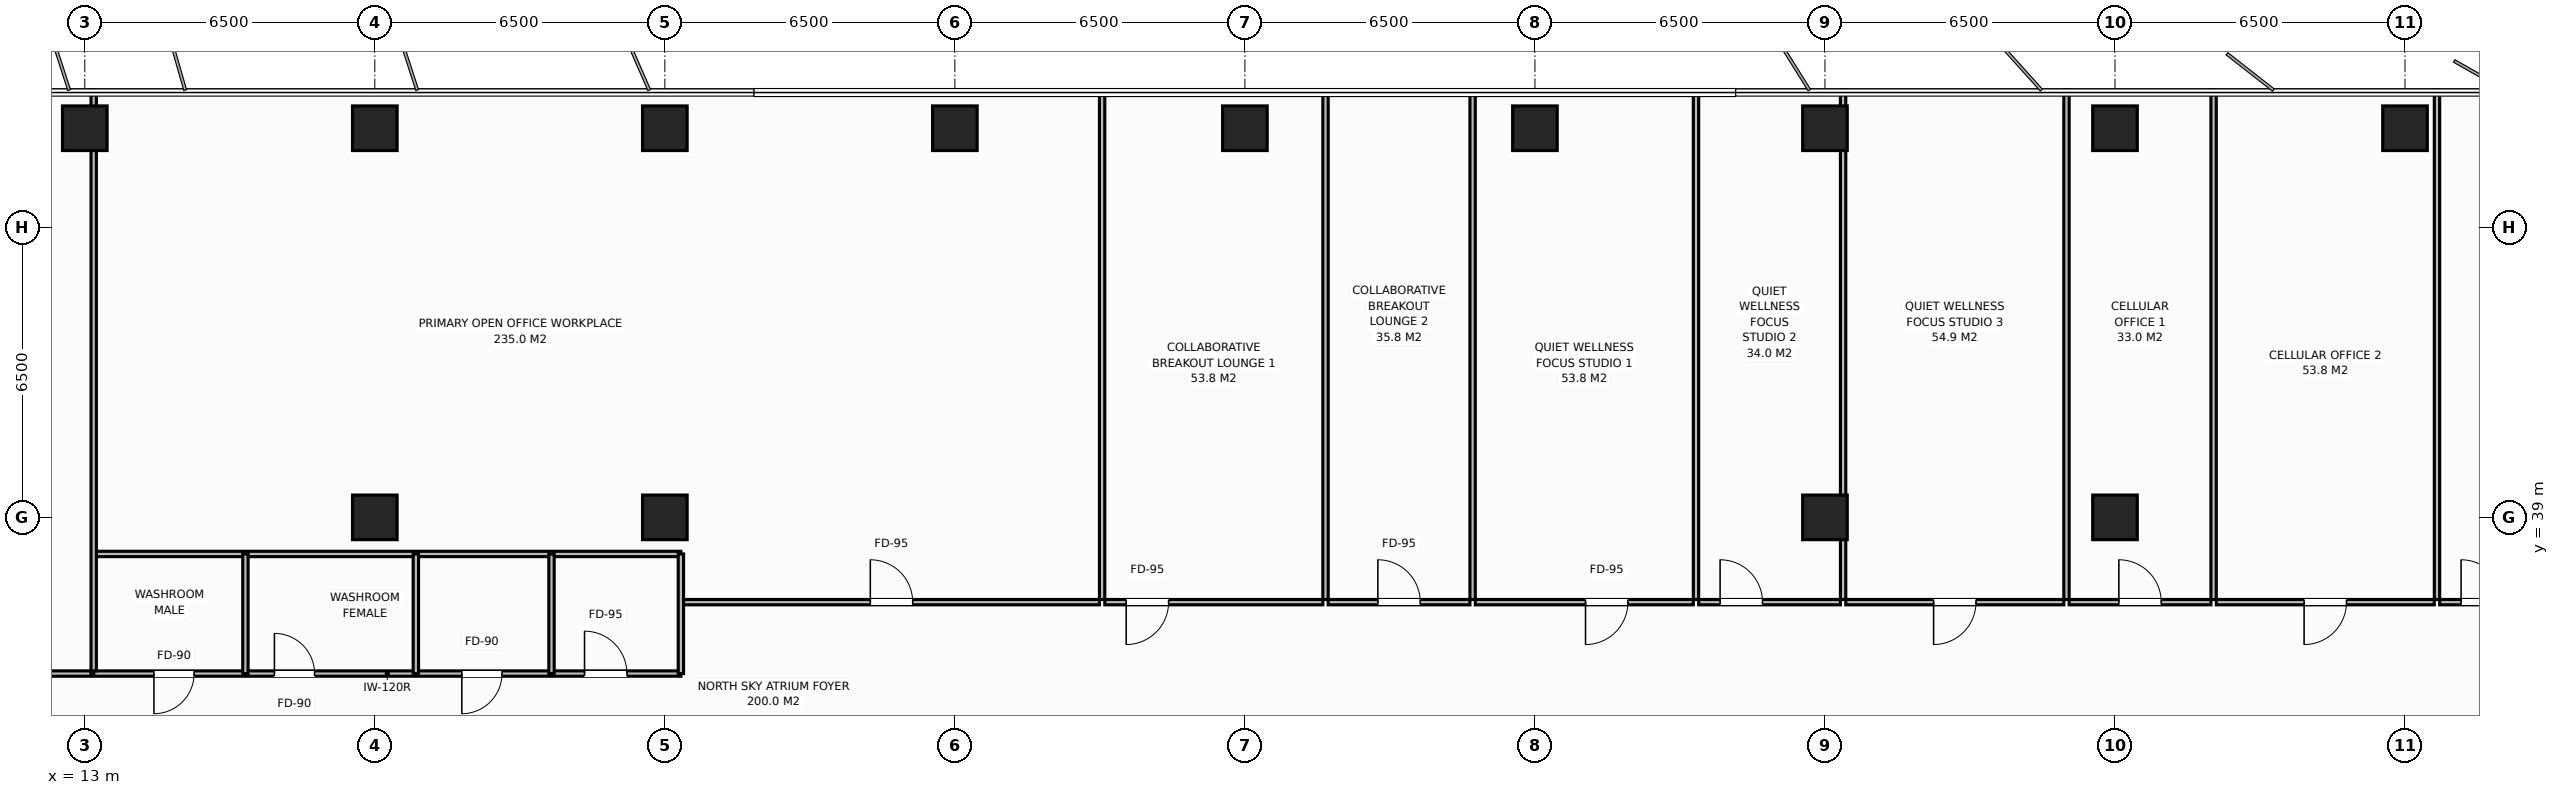
"""IFC4 building model, lengths in metres.
Left out: names, types, materials, properties, quantities, classifications, styles, units other than length and angle.
Written with IfcOpenShell. Run it as: python <this file> out.ifc"""

import sys

from ifc_helpers import new_model, si_unit, direction, frame, frame_2d, origin, origin_2d, place, context, subcontext, project, spatial, rectangle, extrude, element, fill, save


model = new_model("IFC4")
c1 = context("Model", 3, precision=1e-05, world=origin(), true_north=direction((0.0, 1.0)))
c2 = subcontext(c1, "Body", "Model", "MODEL_VIEW")
j1 = project(units=[si_unit("LENGTHUNIT", "METRE"), si_unit("PLANEANGLEUNIT", "RADIAN")], contexts=[c1])
p1 = place(None, origin())
s1 = spatial("IfcSite", under=j1, at=p1, CompositionType="ELEMENT")
p2 = place(p1, origin())
s2 = spatial("IfcBuilding", under=s1, at=p2, CompositionType="ELEMENT")
p3 = place(p2, frame((0.0, 0.0, 193.6)))
s3 = spatial("IfcBuildingStorey", under=s2, at=p3, CompositionType="ELEMENT", Elevation=193.6)
for number, where, z_axis, x_axis in (
    (1, (19.5, 39.0, 0.0), (0.0, 0.0, 1.0), (1.0, 0.0, 0.0)),
    (2, (58.5, 39.0, 0.0), (0.0, 0.0, 1.0), (1.0, 0.0, 0.0)),
    (3, (26.0, 39.0, 0.0), (0.0, 0.0, 1.0), (1.0, 0.0, 0.0)),
    (4, (52.0, 39.0, 0.0), (0.0, 0.0, 1.0), (1.0, 0.0, 0.0)),
    (5, (13.0, 47.72, 0.0), (0.0, 0.0, 1.0), (1.0, 0.0, 0.0)),
    (6, (19.5, 47.72, 0.0), (0.0, 0.0, 1.0), (1.0, 0.0, 0.0)),
    (7, (26.0, 47.72, 0.0), (0.0, 0.0, 1.0), (1.0, 0.0, 0.0)),
    (8, (32.5, 47.72, 0.0), (0.0, 0.0, 1.0), (1.0, 0.0, 0.0)),
    (9, (39.0, 47.72, 0.0), (0.0, 0.0, 1.0), (1.0, 0.0, 0.0)),
    (10, (45.5, 47.72, 0.0), (0.0, 0.0, 1.0), (1.0, 0.0, 0.0)),
    (11, (52.0, 47.72, 0.0), (0.0, 0.0, 1.0), (1.0, 0.0, 0.0)),
    (12, (58.5, 47.72, 0.0), (0.0, 0.0, 1.0), (1.0, 0.0, 0.0)),
    (13, (65.0, 47.72, 0.0), (0.0, 0.0, 1.0), (1.0, 0.0, 0.0)),
):
    element("IfcColumn", number, at=place(p3, frame(where, z_axis=z_axis, x_axis=x_axis)), inside=s3, PredefinedType="COLUMN", context=c2, shape_type="SweptSolid", body=[
        extrude(rectangle(XDim=1.0, YDim=1.0, at=origin_2d()), origin(), (0.0, 0.0, 1.0), 3.8),
    ])
p4 = place(p3, frame((13.2, 35.5, 0.0), z_axis=(0.0, 0.0, 1.0), x_axis=(1.0, 0.0, 0.0)))
e14 = element("IfcWall", 14, at=p4, inside=s3, PredefinedType="PARTITIONING", context=c2, shape_type="SweptSolid", body=[
    extrude(rectangle(XDim=13.16, YDim=0.12, at=frame_2d((6.58, 0.0))), origin(), (0.0, 0.0, 1.0), 3.52),
])
p5 = place(p4, frame((1.35, 0.0, 0.0)))
e15 = element("IfcOpeningElement", 15, at=p5, cuts=e14, PredefinedType="OPENING", context=c2, shape_type="SweptSolid", body=[
    extrude(rectangle(XDim=0.9, YDim=2.15, at=frame_2d((0.45, 1.075))), frame((0.0, 0.07, 0.0), z_axis=(0.0, -1.0, 0.0), x_axis=(1.0, 0.0, 0.0)), (0.0, 0.0, 1.0), 0.14),
])
p6 = place(p4, frame((4.05, 0.0, 0.0)))
e16 = element("IfcOpeningElement", 16, at=p6, cuts=e14, PredefinedType="OPENING", context=c2, shape_type="SweptSolid", body=[
    extrude(rectangle(XDim=0.9, YDim=2.15, at=frame_2d((0.45, 1.075))), frame((0.0, 0.07, 0.0), z_axis=(0.0, -1.0, 0.0), x_axis=(1.0, 0.0, 0.0)), (0.0, 0.0, 1.0), 0.14),
])
p7 = place(p4, frame((8.25, 0.0, 0.0)))
e17 = element("IfcOpeningElement", 17, at=p7, cuts=e14, PredefinedType="OPENING", context=c2, shape_type="SweptSolid", body=[
    extrude(rectangle(XDim=0.9, YDim=2.15, at=frame_2d((0.45, 1.075))), frame((0.0, 0.07, 0.0), z_axis=(0.0, -1.0, 0.0), x_axis=(1.0, 0.0, 0.0)), (0.0, 0.0, 1.0), 0.14),
])
p8 = place(p4, frame((11.0, 0.0, 0.0)))
e18 = element("IfcOpeningElement", 18, at=p8, cuts=e14, PredefinedType="OPENING", context=c2, shape_type="SweptSolid", body=[
    extrude(rectangle(XDim=0.95, YDim=2.15, at=frame_2d((0.475, 1.075))), frame((0.0, 0.07, 0.0), z_axis=(0.0, -1.0, 0.0), x_axis=(1.0, 0.0, 0.0)), (0.0, 0.0, 1.0), 0.14),
])
p9 = place(p3, frame((13.2, 38.18, 0.0), z_axis=(0.0, 0.0, 1.0), x_axis=(1.0, 0.0, 0.0)))
e19 = element("IfcWall", 19, at=p9, inside=s3, PredefinedType="PARTITIONING", context=c2, shape_type="SweptSolid", body=[
    extrude(rectangle(XDim=13.16, YDim=0.12, at=frame_2d((6.58, 0.0))), origin(), (0.0, 0.0, 1.0), 3.52),
])
for number, where, z_axis, x_axis in (
    (20, (16.6, 35.5, 0.0), (0.0, 0.0, 1.0), (0.0, 1.0, 0.0)),
    (21, (20.42, 35.5, 0.0), (0.0, 0.0, 1.0), (0.0, 1.0, 0.0)),
    (22, (23.46, 35.5, 0.0), (0.0, 0.0, 1.0), (0.0, 1.0, 0.0)),
    (23, (26.36, 35.5, 0.0), (0.0, 0.0, 1.0), (0.0, 1.0, 0.0)),
):
    element("IfcWall", number, at=place(p3, frame(where, z_axis=z_axis, x_axis=x_axis)), inside=s3, PredefinedType="PARTITIONING", context=c2, shape_type="SweptSolid", body=[
        extrude(rectangle(XDim=2.68, YDim=0.12, at=frame_2d((1.34, 0.0))), origin(), (0.0, 0.0, 1.0), 3.52),
    ])
p10 = place(p3, frame((13.2, 35.56, 0.0), z_axis=(0.0, 0.0, 1.0), x_axis=(0.0, 1.0, 0.0)))
e24 = element("IfcWall", 24, at=p10, inside=s3, PredefinedType="PARTITIONING", context=c2, shape_type="SweptSolid", body=[
    extrude(rectangle(XDim=13.02, YDim=0.12, at=frame_2d((6.51, 0.0))), origin(), (0.0, 0.0, 1.0), 2.72),
])
p11 = place(p3, frame((3.98, 35.5, 0.0), z_axis=(0.0, 0.0, 1.0), x_axis=(1.0, 0.0, 0.0)))
e25 = element("IfcWall", 25, at=p11, inside=s3, PredefinedType="PARTITIONING", context=c2, shape_type="SweptSolid", body=[
    extrude(rectangle(XDim=9.16, YDim=0.12, at=frame_2d((4.58, 0.0))), origin(), (0.0, 0.0, 1.0), 3.52),
])
p12 = place(p11, frame((6.9, 0.0, 0.0)))
e26 = element("IfcOpeningElement", 26, at=p12, cuts=e25, PredefinedType="OPENING", context=c2, shape_type="SweptSolid", body=[
    extrude(rectangle(XDim=0.95, YDim=2.15, at=frame_2d((0.475, 1.075))), frame((0.0, 0.07, 0.0), z_axis=(0.0, -1.0, 0.0), x_axis=(1.0, 0.0, 0.0)), (0.0, 0.0, 1.0), 0.14),
])
p13 = place(p3, frame((35.8, 37.16, 0.0), z_axis=(0.0, 0.0, 1.0), x_axis=(0.0, 1.0, 0.0)))
e27 = element("IfcWall", 27, at=p13, inside=s3, PredefinedType="PARTITIONING", context=c2, shape_type="SweptSolid", body=[
    extrude(rectangle(XDim=11.42, YDim=0.12, at=frame_2d((5.71, 0.0))), origin(), (0.0, 0.0, 1.0), 3.52),
])
p14 = place(p3, frame((26.42, 37.1, 0.0), z_axis=(0.0, 0.0, 1.0), x_axis=(1.0, 0.0, 0.0)))
e28 = element("IfcWall", 28, at=p14, inside=s3, PredefinedType="PARTITIONING", context=c2, shape_type="SweptSolid", body=[
    extrude(rectangle(XDim=9.32, YDim=0.12, at=frame_2d((4.66, 0.0))), origin(), (0.0, 0.0, 1.0), 3.52),
])
p15 = place(p14, frame((4.185, 0.0, 0.0)))
e29 = element("IfcOpeningElement", 29, at=p15, cuts=e28, PredefinedType="OPENING", context=c2, shape_type="SweptSolid", body=[
    extrude(rectangle(XDim=0.95, YDim=2.15, at=frame_2d((0.475, 1.075))), frame((0.0, 0.07, 0.0), z_axis=(0.0, -1.0, 0.0), x_axis=(1.0, 0.0, 0.0)), (0.0, 0.0, 1.0), 0.14),
])
p16 = place(p3, frame((40.806, 37.16, 0.0), z_axis=(0.0, 0.0, 1.0), x_axis=(0.0, 1.0, 0.0)))
e30 = element("IfcWall", 30, at=p16, inside=s3, PredefinedType="PARTITIONING", context=c2, shape_type="SweptSolid", body=[
    extrude(rectangle(XDim=11.42, YDim=0.12, at=frame_2d((5.71, 0.0))), origin(), (0.0, 0.0, 1.0), 3.52),
])
p17 = place(p3, frame((35.86, 37.1, 0.0), z_axis=(0.0, 0.0, 1.0), x_axis=(1.0, 0.0, 0.0)))
e31 = element("IfcWall", 31, at=p17, inside=s3, PredefinedType="PARTITIONING", context=c2, shape_type="SweptSolid", body=[
    extrude(rectangle(XDim=4.886, YDim=0.12, at=frame_2d((2.443, 0.0))), origin(), (0.0, 0.0, 1.0), 3.52),
])
p18 = place(p17, frame((0.48, 0.0, 0.0)))
e32 = element("IfcOpeningElement", 32, at=p18, cuts=e31, PredefinedType="OPENING", context=c2, shape_type="SweptSolid", body=[
    extrude(rectangle(XDim=0.95, YDim=2.15, at=frame_2d((0.475, 1.075))), frame((0.0, 0.07, 0.0), z_axis=(0.0, -1.0, 0.0), x_axis=(1.0, 0.0, 0.0)), (0.0, 0.0, 1.0), 0.14),
])
p19 = place(p3, frame((44.104, 37.16, 0.0), z_axis=(0.0, 0.0, 1.0), x_axis=(0.0, 1.0, 0.0)))
e33 = element("IfcWall", 33, at=p19, inside=s3, PredefinedType="PARTITIONING", context=c2, shape_type="SweptSolid", body=[
    extrude(rectangle(XDim=11.42, YDim=0.12, at=frame_2d((5.71, 0.0))), origin(), (0.0, 0.0, 1.0), 3.52),
])
p20 = place(p3, frame((40.866, 37.1, 0.0), z_axis=(0.0, 0.0, 1.0), x_axis=(1.0, 0.0, 0.0)))
e34 = element("IfcWall", 34, at=p20, inside=s3, PredefinedType="PARTITIONING", context=c2, shape_type="SweptSolid", body=[
    extrude(rectangle(XDim=3.177, YDim=0.12, at=frame_2d((1.588, 0.0))), origin(), (0.0, 0.0, 1.0), 3.52),
])
p21 = place(p20, frame((1.113, 0.0, 0.0)))
e35 = element("IfcOpeningElement", 35, at=p21, cuts=e34, PredefinedType="OPENING", context=c2, shape_type="SweptSolid", body=[
    extrude(rectangle(XDim=0.95, YDim=2.15, at=frame_2d((0.475, 1.075))), frame((0.0, 0.07, 0.0), z_axis=(0.0, -1.0, 0.0), x_axis=(1.0, 0.0, 0.0)), (0.0, 0.0, 1.0), 0.14),
])
p22 = place(p3, frame((49.11, 37.16, 0.0), z_axis=(0.0, 0.0, 1.0), x_axis=(0.0, 1.0, 0.0)))
e36 = element("IfcWall", 36, at=p22, inside=s3, PredefinedType="PARTITIONING", context=c2, shape_type="SweptSolid", body=[
    extrude(rectangle(XDim=11.42, YDim=0.12, at=frame_2d((5.71, 0.0))), origin(), (0.0, 0.0, 1.0), 3.52),
])
p23 = place(p3, frame((44.163, 37.1, 0.0), z_axis=(0.0, 0.0, 1.0), x_axis=(1.0, 0.0, 0.0)))
e37 = element("IfcWall", 37, at=p23, inside=s3, PredefinedType="PARTITIONING", context=c2, shape_type="SweptSolid", body=[
    extrude(rectangle(XDim=4.886, YDim=0.12, at=frame_2d((2.443, 0.0))), origin(), (0.0, 0.0, 1.0), 3.52),
])
p24 = place(p23, frame((2.47, 0.0, 0.0)))
e38 = element("IfcOpeningElement", 38, at=p24, cuts=e37, PredefinedType="OPENING", context=c2, shape_type="SweptSolid", body=[
    extrude(rectangle(XDim=0.95, YDim=2.15, at=frame_2d((0.475, 1.075))), frame((0.0, 0.07, 0.0), z_axis=(0.0, -1.0, 0.0), x_axis=(1.0, 0.0, 0.0)), (0.0, 0.0, 1.0), 0.14),
])
p25 = place(p3, frame((52.407, 37.16, 0.0), z_axis=(0.0, 0.0, 1.0), x_axis=(0.0, 1.0, 0.0)))
e39 = element("IfcWall", 39, at=p25, inside=s3, PredefinedType="PARTITIONING", context=c2, shape_type="SweptSolid", body=[
    extrude(rectangle(XDim=11.42, YDim=0.12, at=frame_2d((5.71, 0.0))), origin(), (0.0, 0.0, 1.0), 3.52),
])
p26 = place(p3, frame((49.17, 37.1, 0.0), z_axis=(0.0, 0.0, 1.0), x_axis=(1.0, 0.0, 0.0)))
e40 = element("IfcWall", 40, at=p26, inside=s3, PredefinedType="PARTITIONING", context=c2, shape_type="SweptSolid", body=[
    extrude(rectangle(XDim=3.177, YDim=0.12, at=frame_2d((1.588, 0.0))), origin(), (0.0, 0.0, 1.0), 3.52),
])
p27 = place(p26, frame((0.48, 0.0, 0.0)))
e41 = element("IfcOpeningElement", 41, at=p27, cuts=e40, PredefinedType="OPENING", context=c2, shape_type="SweptSolid", body=[
    extrude(rectangle(XDim=0.95, YDim=2.15, at=frame_2d((0.475, 1.075))), frame((0.0, 0.07, 0.0), z_axis=(0.0, -1.0, 0.0), x_axis=(1.0, 0.0, 0.0)), (0.0, 0.0, 1.0), 0.14),
])
p28 = place(p3, frame((57.413, 37.16, 0.0), z_axis=(0.0, 0.0, 1.0), x_axis=(0.0, 1.0, 0.0)))
e42 = element("IfcWall", 42, at=p28, inside=s3, PredefinedType="PARTITIONING", context=c2, shape_type="SweptSolid", body=[
    extrude(rectangle(XDim=11.42, YDim=0.12, at=frame_2d((5.71, 0.0))), origin(), (0.0, 0.0, 1.0), 3.52),
])
p29 = place(p3, frame((52.467, 37.1, 0.0), z_axis=(0.0, 0.0, 1.0), x_axis=(1.0, 0.0, 0.0)))
e43 = element("IfcWall", 43, at=p29, inside=s3, PredefinedType="PARTITIONING", context=c2, shape_type="SweptSolid", body=[
    extrude(rectangle(XDim=4.886, YDim=0.12, at=frame_2d((2.443, 0.0))), origin(), (0.0, 0.0, 1.0), 3.52),
])
p30 = place(p29, frame((1.968, 0.0, 0.0)))
e44 = element("IfcOpeningElement", 44, at=p30, cuts=e43, PredefinedType="OPENING", context=c2, shape_type="SweptSolid", body=[
    extrude(rectangle(XDim=0.95, YDim=2.15, at=frame_2d((0.475, 1.075))), frame((0.0, 0.07, 0.0), z_axis=(0.0, -1.0, 0.0), x_axis=(1.0, 0.0, 0.0)), (0.0, 0.0, 1.0), 0.14),
])
p31 = place(p3, frame((60.71, 37.16, 0.0), z_axis=(0.0, 0.0, 1.0), x_axis=(0.0, 1.0, 0.0)))
e45 = element("IfcWall", 45, at=p31, inside=s3, PredefinedType="PARTITIONING", context=c2, shape_type="SweptSolid", body=[
    extrude(rectangle(XDim=11.42, YDim=0.12, at=frame_2d((5.71, 0.0))), origin(), (0.0, 0.0, 1.0), 3.52),
])
p32 = place(p3, frame((57.473, 37.1, 0.0), z_axis=(0.0, 0.0, 1.0), x_axis=(1.0, 0.0, 0.0)))
e46 = element("IfcWall", 46, at=p32, inside=s3, PredefinedType="PARTITIONING", context=c2, shape_type="SweptSolid", body=[
    extrude(rectangle(XDim=3.177, YDim=0.12, at=frame_2d((1.588, 0.0))), origin(), (0.0, 0.0, 1.0), 3.52),
])
p33 = place(p32, frame((1.114, 0.0, 0.0)))
e47 = element("IfcOpeningElement", 47, at=p33, cuts=e46, PredefinedType="OPENING", context=c2, shape_type="SweptSolid", body=[
    extrude(rectangle(XDim=0.95, YDim=2.15, at=frame_2d((0.475, 1.075))), frame((0.0, 0.07, 0.0), z_axis=(0.0, -1.0, 0.0), x_axis=(1.0, 0.0, 0.0)), (0.0, 0.0, 1.0), 0.14),
])
p34 = place(p3, frame((65.717, 37.16, 0.0), z_axis=(0.0, 0.0, 1.0), x_axis=(0.0, 1.0, 0.0)))
e48 = element("IfcWall", 48, at=p34, inside=s3, PredefinedType="PARTITIONING", context=c2, shape_type="SweptSolid", body=[
    extrude(rectangle(XDim=11.42, YDim=0.12, at=frame_2d((5.71, 0.0))), origin(), (0.0, 0.0, 1.0), 3.52),
])
p35 = place(p3, frame((60.77, 37.1, 0.0), z_axis=(0.0, 0.0, 1.0), x_axis=(1.0, 0.0, 0.0)))
e49 = element("IfcWall", 49, at=p35, inside=s3, PredefinedType="PARTITIONING", context=c2, shape_type="SweptSolid", body=[
    extrude(rectangle(XDim=4.886, YDim=0.12, at=frame_2d((2.443, 0.0))), origin(), (0.0, 0.0, 1.0), 3.52),
])
p36 = place(p35, frame((1.968, 0.0, 0.0)))
e50 = element("IfcOpeningElement", 50, at=p36, cuts=e49, PredefinedType="OPENING", context=c2, shape_type="SweptSolid", body=[
    extrude(rectangle(XDim=0.95, YDim=2.15, at=frame_2d((0.475, 1.075))), frame((0.0, 0.07, 0.0), z_axis=(0.0, -1.0, 0.0), x_axis=(1.0, 0.0, 0.0)), (0.0, 0.0, 1.0), 0.14),
])
p37 = place(p3, frame((65.777, 37.1, 0.0), z_axis=(0.0, 0.0, 1.0), x_axis=(1.0, 0.0, 0.0)))
e51 = element("IfcWall", 51, at=p37, inside=s3, PredefinedType="PARTITIONING", context=c2, shape_type="SweptSolid", body=[
    extrude(rectangle(XDim=3.177, YDim=0.12, at=frame_2d((1.588, 0.0))), origin(), (0.0, 0.0, 1.0), 3.52),
])
p38 = place(p37, frame((0.48, 0.0, 0.0)))
e52 = element("IfcOpeningElement", 52, at=p38, cuts=e51, PredefinedType="OPENING", context=c2, shape_type="SweptSolid", body=[
    extrude(rectangle(XDim=0.95, YDim=2.15, at=frame_2d((0.475, 1.075))), frame((0.0, 0.07, 0.0), z_axis=(0.0, -1.0, 0.0), x_axis=(1.0, 0.0, 0.0)), (0.0, 0.0, 1.0), 0.14),
])
p39 = place(p5, origin())
e53 = element("IfcDoor", 53, at=p39, inside=s3, OperationType="SINGLE_SWING_RIGHT", PredefinedType="DOOR", context=c2, shape_type="SweptSolid", body=[
    extrude(rectangle(XDim=0.9, YDim=2.15, at=frame_2d((0.45, 1.075))), frame((0.0, 0.025, 0.0), z_axis=(0.0, -1.0, 0.0), x_axis=(1.0, 0.0, 0.0)), (0.0, 0.0, 1.0), 0.05),
])
fill(e15, e53)
p40 = place(p6, origin())
e54 = element("IfcDoor", 54, at=p40, inside=s3, OperationType="SINGLE_SWING_LEFT", PredefinedType="DOOR", context=c2, shape_type="SweptSolid", body=[
    extrude(rectangle(XDim=0.9, YDim=2.15, at=frame_2d((0.45, 1.075))), frame((0.0, 0.025, 0.0), z_axis=(0.0, -1.0, 0.0), x_axis=(1.0, 0.0, 0.0)), (0.0, 0.0, 1.0), 0.05),
])
fill(e16, e54)
p41 = place(p7, origin())
e55 = element("IfcDoor", 55, at=p41, inside=s3, OperationType="SINGLE_SWING_RIGHT", PredefinedType="DOOR", context=c2, shape_type="SweptSolid", body=[
    extrude(rectangle(XDim=0.9, YDim=2.15, at=frame_2d((0.45, 1.075))), frame((0.0, 0.025, 0.0), z_axis=(0.0, -1.0, 0.0), x_axis=(1.0, 0.0, 0.0)), (0.0, 0.0, 1.0), 0.05),
])
fill(e17, e55)
p42 = place(p8, origin())
e56 = element("IfcDoor", 56, at=p42, inside=s3, OperationType="SINGLE_SWING_LEFT", PredefinedType="DOOR", context=c2, shape_type="SweptSolid", body=[
    extrude(rectangle(XDim=0.95, YDim=2.15, at=frame_2d((0.475, 1.075))), frame((0.0, 0.025, 0.0), z_axis=(0.0, -1.0, 0.0), x_axis=(1.0, 0.0, 0.0)), (0.0, 0.0, 1.0), 0.05),
])
fill(e18, e56)
p43 = place(p15, origin())
e57 = element("IfcDoor", 57, at=p43, inside=s3, OperationType="SINGLE_SWING_LEFT", PredefinedType="DOOR", context=c2, shape_type="SweptSolid", body=[
    extrude(rectangle(XDim=0.95, YDim=2.15, at=frame_2d((0.475, 1.075))), frame((0.0, 0.025, 0.0), z_axis=(0.0, -1.0, 0.0), x_axis=(1.0, 0.0, 0.0)), (0.0, 0.0, 1.0), 0.05),
])
fill(e29, e57)
p44 = place(p18, origin())
e58 = element("IfcDoor", 58, at=p44, inside=s3, OperationType="SINGLE_SWING_RIGHT", PredefinedType="DOOR", context=c2, shape_type="SweptSolid", body=[
    extrude(rectangle(XDim=0.95, YDim=2.15, at=frame_2d((0.475, 1.075))), frame((0.0, 0.025, 0.0), z_axis=(0.0, -1.0, 0.0), x_axis=(1.0, 0.0, 0.0)), (0.0, 0.0, 1.0), 0.05),
])
fill(e32, e58)
p45 = place(p21, origin())
e59 = element("IfcDoor", 59, at=p45, inside=s3, OperationType="SINGLE_SWING_LEFT", PredefinedType="DOOR", context=c2, shape_type="SweptSolid", body=[
    extrude(rectangle(XDim=0.95, YDim=2.15, at=frame_2d((0.475, 1.075))), frame((0.0, 0.025, 0.0), z_axis=(0.0, -1.0, 0.0), x_axis=(1.0, 0.0, 0.0)), (0.0, 0.0, 1.0), 0.05),
])
fill(e35, e59)
p46 = place(p24, origin())
e60 = element("IfcDoor", 60, at=p46, inside=s3, OperationType="SINGLE_SWING_RIGHT", PredefinedType="DOOR", context=c2, shape_type="SweptSolid", body=[
    extrude(rectangle(XDim=0.95, YDim=2.15, at=frame_2d((0.475, 1.075))), frame((0.0, 0.025, 0.0), z_axis=(0.0, -1.0, 0.0), x_axis=(1.0, 0.0, 0.0)), (0.0, 0.0, 1.0), 0.05),
])
fill(e38, e60)
p47 = place(p27, origin())
e61 = element("IfcDoor", 61, at=p47, inside=s3, OperationType="SINGLE_SWING_LEFT", PredefinedType="DOOR", context=c2, shape_type="SweptSolid", body=[
    extrude(rectangle(XDim=0.95, YDim=2.15, at=frame_2d((0.475, 1.075))), frame((0.0, 0.025, 0.0), z_axis=(0.0, -1.0, 0.0), x_axis=(1.0, 0.0, 0.0)), (0.0, 0.0, 1.0), 0.05),
])
fill(e41, e61)
p48 = place(p30, origin())
e62 = element("IfcDoor", 62, at=p48, inside=s3, OperationType="SINGLE_SWING_RIGHT", PredefinedType="DOOR", context=c2, shape_type="SweptSolid", body=[
    extrude(rectangle(XDim=0.95, YDim=2.15, at=frame_2d((0.475, 1.075))), frame((0.0, 0.025, 0.0), z_axis=(0.0, -1.0, 0.0), x_axis=(1.0, 0.0, 0.0)), (0.0, 0.0, 1.0), 0.05),
])
fill(e44, e62)
p49 = place(p33, origin())
e63 = element("IfcDoor", 63, at=p49, inside=s3, OperationType="SINGLE_SWING_LEFT", PredefinedType="DOOR", context=c2, shape_type="SweptSolid", body=[
    extrude(rectangle(XDim=0.95, YDim=2.15, at=frame_2d((0.475, 1.075))), frame((0.0, 0.025, 0.0), z_axis=(0.0, -1.0, 0.0), x_axis=(1.0, 0.0, 0.0)), (0.0, 0.0, 1.0), 0.05),
])
fill(e47, e63)
p50 = place(p36, origin())
e64 = element("IfcDoor", 64, at=p50, inside=s3, OperationType="SINGLE_SWING_RIGHT", PredefinedType="DOOR", context=c2, shape_type="SweptSolid", body=[
    extrude(rectangle(XDim=0.95, YDim=2.15, at=frame_2d((0.475, 1.075))), frame((0.0, 0.025, 0.0), z_axis=(0.0, -1.0, 0.0), x_axis=(1.0, 0.0, 0.0)), (0.0, 0.0, 1.0), 0.05),
])
fill(e50, e64)
p51 = place(p38, origin())
e65 = element("IfcDoor", 65, at=p51, inside=s3, OperationType="SINGLE_SWING_LEFT", PredefinedType="DOOR", context=c2, shape_type="SweptSolid", body=[
    extrude(rectangle(XDim=0.95, YDim=2.15, at=frame_2d((0.475, 1.075))), frame((0.0, 0.025, 0.0), z_axis=(0.0, -1.0, 0.0), x_axis=(1.0, 0.0, 0.0)), (0.0, 0.0, 1.0), 0.05),
])
fill(e52, e65)
save(model, sys.argv[1])
